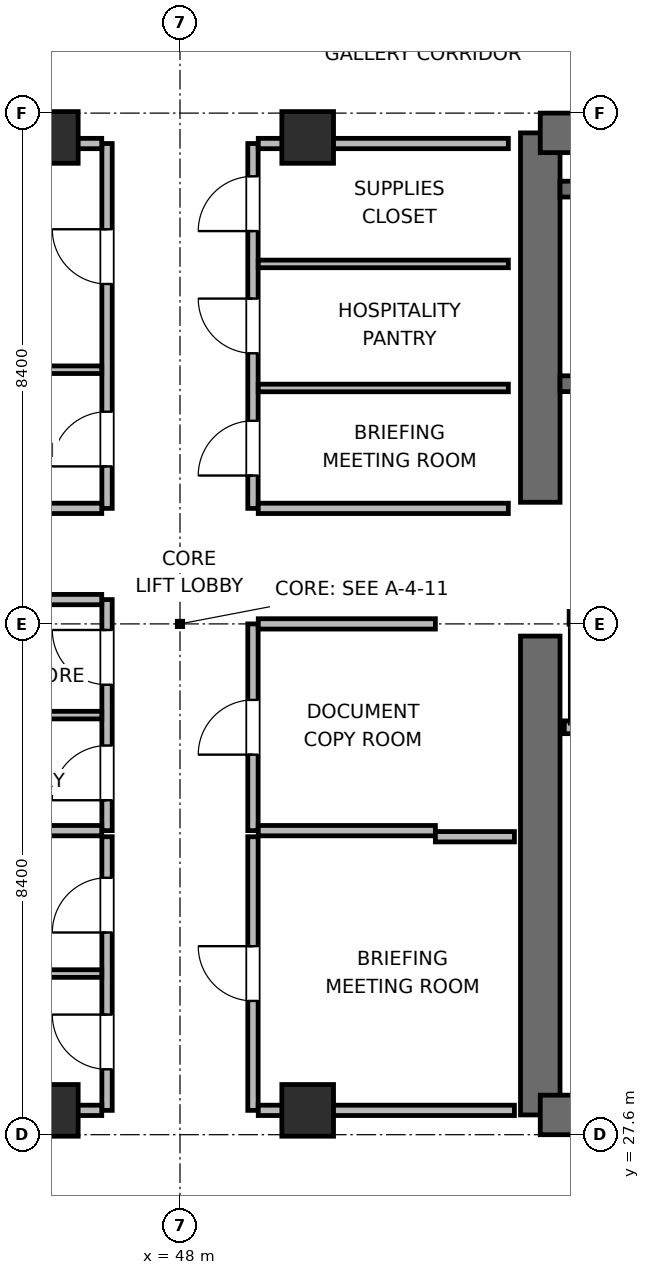
"""IFC4 building model, lengths in metres.
Left out: names, types, materials, properties, quantities, classifications, styles, units other than length and angle.
Written with IfcOpenShell. Run it as: python <this file> out.ifc"""

import sys

from ifc_helpers import new_model, si_unit, direction, frame, frame_2d, origin, origin_2d, place, context, subcontext, project, spatial, rectangle, extrude, element, fill, save


model = new_model("IFC4")
c1 = context("Model", 3, precision=1e-05, world=origin(), true_north=direction((0.0, 1.0)))
c2 = subcontext(c1, "Body", "Model", "MODEL_VIEW")
j1 = project(units=[si_unit("LENGTHUNIT", "METRE"), si_unit("PLANEANGLEUNIT", "RADIAN")], contexts=[c1])
p1 = place(None, origin())
s1 = spatial("IfcSite", under=j1, at=p1, CompositionType="ELEMENT")
p2 = place(p1, origin())
s2 = spatial("IfcBuilding", under=s1, at=p2, CompositionType="ELEMENT")
p3 = place(p2, frame((0.0, 0.0, 251.1)))
s3 = spatial("IfcBuildingStorey", under=s2, at=p3, CompositionType="ELEMENT", Elevation=251.1)
p4 = place(p3, frame((53.925, 27.925, 0.0), z_axis=(0.0, 0.0, 1.0), x_axis=(0.0, 1.0, 0.0)))
e1 = element("IfcWall", 1, at=p4, inside=s3, PredefinedType="SHEAR", context=c2, shape_type="SweptSolid", body=[
    extrude(rectangle(XDim=7.875, YDim=0.65, at=frame_2d((3.938, 0.0))), origin(), (0.0, 0.0, 1.0), 3.9),
])
p5 = place(p3, frame((53.925, 38.0, 0.0), z_axis=(0.0, 0.0, 1.0), x_axis=(0.0, 1.0, 0.0)))
e2 = element("IfcWall", 2, at=p5, inside=s3, PredefinedType="SHEAR", context=c2, shape_type="SweptSolid", body=[
    extrude(rectangle(XDim=6.075, YDim=0.65, at=frame_2d((3.038, 0.0))), origin(), (0.0, 0.0, 1.0), 3.9),
])
p6 = place(p3, frame((53.925, 27.925, 0.0), z_axis=(0.0, 0.0, 1.0), x_axis=(1.0, 0.0, 0.0)))
e3 = element("IfcWall", 3, at=p6, inside=s3, PredefinedType="SHEAR", context=c2, shape_type="SweptSolid", body=[
    extrude(rectangle(XDim=9.35, YDim=0.65, at=frame_2d((4.675, 0.0))), origin(), (0.0, 0.0, 1.0), 3.9),
])
p7 = place(p6, frame((3.975, 0.0, 0.0)))
e4 = element("IfcOpeningElement", 4, at=p7, cuts=e3, PredefinedType="OPENING", context=c2, shape_type="SweptSolid", body=[
    extrude(rectangle(XDim=1.05, YDim=2.04, at=frame_2d((0.525, 1.02))), frame((0.0, 0.335, 0.0), z_axis=(0.0, -1.0, 0.0), x_axis=(1.0, 0.0, 0.0)), (0.0, 0.0, 1.0), 0.67),
])
p8 = place(p3, frame((53.925, 44.075, 0.0), z_axis=(0.0, 0.0, 1.0), x_axis=(1.0, 0.0, 0.0)))
e5 = element("IfcWall", 5, at=p8, inside=s3, PredefinedType="SHEAR", context=c2, shape_type="SweptSolid", body=[
    extrude(rectangle(XDim=9.35, YDim=0.65, at=frame_2d((4.675, 0.0))), origin(), (0.0, 0.0, 1.0), 3.9),
])
p9 = place(p3, frame((54.25, 39.95, 0.0), z_axis=(0.0, 0.0, 1.0), x_axis=(1.0, 0.0, 0.0)))
e6 = element("IfcWall", 6, at=p9, inside=s3, PredefinedType="SHEAR", context=c2, shape_type="SweptSolid", body=[
    extrude(rectangle(XDim=8.7, YDim=0.26, at=frame_2d((4.35, 0.0))), origin(), (0.0, 0.0, 1.0), 3.9),
])
p10 = place(p9, frame((0.95, 0.0, 0.0)))
e7 = element("IfcOpeningElement", 7, at=p10, cuts=e6, PredefinedType="OPENING", context=c2, shape_type="SweptSolid", body=[
    extrude(rectangle(XDim=1.0, YDim=2.04, at=frame_2d((0.5, 1.02))), frame((0.0, 0.14, 0.0), z_axis=(0.0, -1.0, 0.0), x_axis=(1.0, 0.0, 0.0)), (0.0, 0.0, 1.0), 0.28),
])
p11 = place(p3, frame((54.25, 43.15, 0.0), z_axis=(0.0, 0.0, 1.0), x_axis=(1.0, 0.0, 0.0)))
e8 = element("IfcWall", 8, at=p11, inside=s3, PredefinedType="SHEAR", context=c2, shape_type="SweptSolid", body=[
    extrude(rectangle(XDim=8.7, YDim=0.26, at=frame_2d((4.35, 0.0))), origin(), (0.0, 0.0, 1.0), 3.9),
])
for number, where, z_axis, x_axis in (
    (9, (45.9, 28.0, 0.0), (0.0, 0.0, 1.0), (1.0, 0.0, 0.0)),
    (10, (50.1, 28.0, 0.0), (0.0, 0.0, 1.0), (1.0, 0.0, 0.0)),
    (11, (45.9, 44.0, 0.0), (0.0, 0.0, 1.0), (1.0, 0.0, 0.0)),
    (12, (50.1, 44.0, 0.0), (0.0, 0.0, 1.0), (1.0, 0.0, 0.0)),
):
    element("IfcColumn", number, at=place(p3, frame(where, z_axis=z_axis, x_axis=x_axis)), inside=s3, PredefinedType="COLUMN", context=c2, shape_type="SweptSolid", body=[
        extrude(rectangle(XDim=0.85, YDim=0.85, at=origin_2d()), origin(), (0.0, 0.0, 1.0), 3.9),
    ])
p12 = place(p3, frame((54.32, 34.3, 0.0), z_axis=(0.0, 0.0, 1.0), x_axis=(1.0, 0.0, 0.0)))
e13 = element("IfcWall", 13, at=p12, inside=s3, PredefinedType="PARTITIONING", context=c2, shape_type="SweptSolid", body=[
    extrude(rectangle(XDim=3.48, YDim=0.21, at=frame_2d((1.74, 0.0))), origin(), (0.0, 0.0, 1.0), 3.68),
])
p13 = place(p3, frame((54.4, 36.1, 0.0), z_axis=(0.0, 0.0, 1.0), x_axis=(1.0, 0.0, 0.0)))
e14 = element("IfcWall", 14, at=p13, inside=s3, PredefinedType="PARTITIONING", context=c2, shape_type="SweptSolid", body=[
    extrude(rectangle(XDim=2.1, YDim=0.21, at=frame_2d((1.05, 0.0))), origin(), (0.0, 0.0, 1.0), 3.68),
])
p14 = place(p13, frame((0.5, 0.0, 0.0)))
e15 = element("IfcOpeningElement", 15, at=p14, cuts=e14, PredefinedType="OPENING", context=c2, shape_type="SweptSolid", body=[
    extrude(rectangle(XDim=1.1, YDim=2.04, at=frame_2d((0.55, 1.02))), frame((0.0, 0.115, 0.0), z_axis=(0.0, -1.0, 0.0), x_axis=(1.0, 0.0, 0.0)), (0.0, 0.0, 1.0), 0.23),
])
p15 = place(p3, frame((46.8, 32.6, 0.0), z_axis=(0.0, 0.0, 1.0), x_axis=(0.0, 1.0, 0.0)))
e16 = element("IfcWall", 16, at=p15, inside=s3, PredefinedType="PARTITIONING", context=c2, shape_type="SweptSolid", body=[
    extrude(rectangle(XDim=3.8, YDim=0.17, at=frame_2d((1.9, 0.0))), origin(), (0.0, 0.0, 1.0), 3.68),
])
p16 = place(p15, frame((0.5, 0.0, 0.0)))
e17 = element("IfcOpeningElement", 17, at=p16, cuts=e16, PredefinedType="OPENING", context=c2, shape_type="SweptSolid", body=[
    extrude(rectangle(XDim=0.9, YDim=2.02, at=frame_2d((0.45, 1.01))), frame((0.0, 0.095, 0.0), z_axis=(0.0, -1.0, 0.0), x_axis=(1.0, 0.0, 0.0)), (0.0, 0.0, 1.0), 0.19),
])
p17 = place(p15, frame((2.4, 0.0, 0.0)))
e18 = element("IfcOpeningElement", 18, at=p17, cuts=e16, PredefinedType="OPENING", context=c2, shape_type="SweptSolid", body=[
    extrude(rectangle(XDim=0.9, YDim=2.02, at=frame_2d((0.45, 1.01))), frame((0.0, 0.095, 0.0), z_axis=(0.0, -1.0, 0.0), x_axis=(1.0, 0.0, 0.0)), (0.0, 0.0, 1.0), 0.19),
])
for number, where, z_axis, x_axis in (
    (19, (43.8, 32.6, 0.0), (0.0, 0.0, 1.0), (1.0, 0.0, 0.0)),
    (20, (43.8, 36.4, 0.0), (0.0, 0.0, 1.0), (1.0, 0.0, 0.0)),
):
    element("IfcWall", number, at=place(p3, frame(where, z_axis=z_axis, x_axis=x_axis)), inside=s3, PredefinedType="PARTITIONING", context=c2, shape_type="SweptSolid", body=[
        extrude(rectangle(XDim=2.913, YDim=0.17, at=frame_2d((1.457, 0.0))), origin(), (0.0, 0.0, 1.0), 3.68),
    ])
p18 = place(p3, frame((43.8, 34.5, 0.0), z_axis=(0.0, 0.0, 1.0), x_axis=(1.0, 0.0, 0.0)))
e21 = element("IfcWall", 21, at=p18, inside=s3, PredefinedType="PARTITIONING", context=c2, shape_type="SweptSolid", body=[
    extrude(rectangle(XDim=2.913, YDim=0.125, at=frame_2d((1.457, 0.0))), origin(), (0.0, 0.0, 1.0), 3.68),
])
p19 = place(p3, frame((49.2, 32.6, 0.0), z_axis=(0.0, 0.0, 1.0), x_axis=(0.0, 1.0, 0.0)))
e22 = element("IfcWall", 22, at=p19, inside=s3, PredefinedType="PARTITIONING", context=c2, shape_type="SweptSolid", body=[
    extrude(rectangle(XDim=3.4, YDim=0.17, at=frame_2d((1.7, 0.0))), origin(), (0.0, 0.0, 1.0), 3.68),
])
p20 = place(p19, frame((1.25, 0.0, 0.0)))
e23 = element("IfcOpeningElement", 23, at=p20, cuts=e22, PredefinedType="OPENING", context=c2, shape_type="SweptSolid", body=[
    extrude(rectangle(XDim=0.9, YDim=2.02, at=frame_2d((0.45, 1.01))), frame((0.0, 0.095, 0.0), z_axis=(0.0, -1.0, 0.0), x_axis=(1.0, 0.0, 0.0)), (0.0, 0.0, 1.0), 0.19),
])
for number, where, z_axis, x_axis in (
    (24, (49.287, 32.6, 0.0), (0.0, 0.0, 1.0), (1.0, 0.0, 0.0)),
    (25, (49.287, 36.0, 0.0), (0.0, 0.0, 1.0), (1.0, 0.0, 0.0)),
):
    element("IfcWall", number, at=place(p3, frame(where, z_axis=z_axis, x_axis=x_axis)), inside=s3, PredefinedType="PARTITIONING", context=c2, shape_type="SweptSolid", body=[
        extrude(rectangle(XDim=2.913, YDim=0.17, at=frame_2d((1.457, 0.0))), origin(), (0.0, 0.0, 1.0), 3.68),
    ])
p21 = place(p3, frame((46.8, 28.0, 0.0), z_axis=(0.0, 0.0, 1.0), x_axis=(0.0, 1.0, 0.0)))
e26 = element("IfcWall", 26, at=p21, inside=s3, PredefinedType="PARTITIONING", context=c2, shape_type="SweptSolid", body=[
    extrude(rectangle(XDim=4.5, YDim=0.17, at=frame_2d((2.25, 0.0))), origin(), (0.0, 0.0, 1.0), 3.68),
])
p22 = place(p21, frame((0.675, 0.0, 0.0)))
e27 = element("IfcOpeningElement", 27, at=p22, cuts=e26, PredefinedType="OPENING", context=c2, shape_type="SweptSolid", body=[
    extrude(rectangle(XDim=0.9, YDim=2.02, at=frame_2d((0.45, 1.01))), frame((0.0, 0.095, 0.0), z_axis=(0.0, -1.0, 0.0), x_axis=(1.0, 0.0, 0.0)), (0.0, 0.0, 1.0), 0.19),
])
p23 = place(p21, frame((2.925, 0.0, 0.0)))
e28 = element("IfcOpeningElement", 28, at=p23, cuts=e26, PredefinedType="OPENING", context=c2, shape_type="SweptSolid", body=[
    extrude(rectangle(XDim=0.9, YDim=2.02, at=frame_2d((0.45, 1.01))), frame((0.0, 0.095, 0.0), z_axis=(0.0, -1.0, 0.0), x_axis=(1.0, 0.0, 0.0)), (0.0, 0.0, 1.0), 0.19),
])
p24 = place(p3, frame((42.5, 28.0, 0.0), z_axis=(0.0, 0.0, 1.0), x_axis=(1.0, 0.0, 0.0)))
e29 = element("IfcWall", 29, at=p24, inside=s3, PredefinedType="PARTITIONING", context=c2, shape_type="SweptSolid", body=[
    extrude(rectangle(XDim=4.213, YDim=0.17, at=frame_2d((2.106, 0.0))), origin(), (0.0, 0.0, 1.0), 2.765),
])
p25 = place(p3, frame((42.5, 30.25, 0.0), z_axis=(0.0, 0.0, 1.0), x_axis=(1.0, 0.0, 0.0)))
e30 = element("IfcWall", 30, at=p25, inside=s3, PredefinedType="PARTITIONING", context=c2, shape_type="SweptSolid", body=[
    extrude(rectangle(XDim=4.213, YDim=0.125, at=frame_2d((2.106, 0.0))), origin(), (0.0, 0.0, 1.0), 3.68),
])
p26 = place(p3, frame((49.2, 28.0, 0.0), z_axis=(0.0, 0.0, 1.0), x_axis=(0.0, 1.0, 0.0)))
e31 = element("IfcWall", 31, at=p26, inside=s3, PredefinedType="PARTITIONING", context=c2, shape_type="SweptSolid", body=[
    extrude(rectangle(XDim=4.5, YDim=0.17, at=frame_2d((2.25, 0.0))), origin(), (0.0, 0.0, 1.0), 3.68),
])
p27 = place(p26, frame((1.8, 0.0, 0.0)))
e32 = element("IfcOpeningElement", 32, at=p27, cuts=e31, PredefinedType="OPENING", context=c2, shape_type="SweptSolid", body=[
    extrude(rectangle(XDim=0.9, YDim=2.02, at=frame_2d((0.45, 1.01))), frame((0.0, 0.095, 0.0), z_axis=(0.0, -1.0, 0.0), x_axis=(1.0, 0.0, 0.0)), (0.0, 0.0, 1.0), 0.19),
])
p28 = place(p3, frame((49.287, 28.0, 0.0), z_axis=(0.0, 0.0, 1.0), x_axis=(1.0, 0.0, 0.0)))
e33 = element("IfcWall", 33, at=p28, inside=s3, PredefinedType="PARTITIONING", context=c2, shape_type="SweptSolid", body=[
    extrude(rectangle(XDim=4.213, YDim=0.17, at=frame_2d((2.106, 0.0))), origin(), (0.0, 0.0, 1.0), 2.765),
])
p29 = place(p3, frame((52.2, 32.5, 0.0), z_axis=(0.0, 0.0, 1.0), x_axis=(1.0, 0.0, 0.0)))
e34 = element("IfcWall", 34, at=p29, inside=s3, PredefinedType="PARTITIONING", context=c2, shape_type="SweptSolid", body=[
    extrude(rectangle(XDim=1.3, YDim=0.17, at=frame_2d((0.65, 0.0))), origin(), (0.0, 0.0, 1.0), 3.68),
])
p30 = place(p3, frame((46.8, 37.9, 0.0), z_axis=(0.0, 0.0, 1.0), x_axis=(0.0, 1.0, 0.0)))
e35 = element("IfcWall", 35, at=p30, inside=s3, PredefinedType="PARTITIONING", context=c2, shape_type="SweptSolid", body=[
    extrude(rectangle(XDim=6.0, YDim=0.17, at=frame_2d((3.0, 0.0))), origin(), (0.0, 0.0, 1.0), 3.68),
])
p31 = place(p30, frame((0.69, 0.0, 0.0)))
e36 = element("IfcOpeningElement", 36, at=p31, cuts=e35, PredefinedType="OPENING", context=c2, shape_type="SweptSolid", body=[
    extrude(rectangle(XDim=0.9, YDim=2.02, at=frame_2d((0.45, 1.01))), frame((0.0, 0.095, 0.0), z_axis=(0.0, -1.0, 0.0), x_axis=(1.0, 0.0, 0.0)), (0.0, 0.0, 1.0), 0.19),
])
p32 = place(p30, frame((3.69, 0.0, 0.0)))
e37 = element("IfcOpeningElement", 37, at=p32, cuts=e35, PredefinedType="OPENING", context=c2, shape_type="SweptSolid", body=[
    extrude(rectangle(XDim=0.9, YDim=2.02, at=frame_2d((0.45, 1.01))), frame((0.0, 0.095, 0.0), z_axis=(0.0, -1.0, 0.0), x_axis=(1.0, 0.0, 0.0)), (0.0, 0.0, 1.0), 0.19),
])
p33 = place(p3, frame((42.5, 37.9, 0.0), z_axis=(0.0, 0.0, 1.0), x_axis=(1.0, 0.0, 0.0)))
e38 = element("IfcWall", 38, at=p33, inside=s3, PredefinedType="PARTITIONING", context=c2, shape_type="SweptSolid", body=[
    extrude(rectangle(XDim=4.213, YDim=0.17, at=frame_2d((2.106, 0.0))), origin(), (0.0, 0.0, 1.0), 3.68),
])
p34 = place(p3, frame((42.5, 43.9, 0.0), z_axis=(0.0, 0.0, 1.0), x_axis=(1.0, 0.0, 0.0)))
e39 = element("IfcWall", 39, at=p34, inside=s3, PredefinedType="PARTITIONING", context=c2, shape_type="SweptSolid", body=[
    extrude(rectangle(XDim=4.213, YDim=0.17, at=frame_2d((2.106, 0.0))), origin(), (0.0, 0.0, 1.0), 2.765),
])
p35 = place(p3, frame((42.5, 40.18, 0.0), z_axis=(0.0, 0.0, 1.0), x_axis=(1.0, 0.0, 0.0)))
e40 = element("IfcWall", 40, at=p35, inside=s3, PredefinedType="PARTITIONING", context=c2, shape_type="SweptSolid", body=[
    extrude(rectangle(XDim=4.213, YDim=0.125, at=frame_2d((2.106, 0.0))), origin(), (0.0, 0.0, 1.0), 3.68),
])
p36 = place(p3, frame((49.2, 37.9, 0.0), z_axis=(0.0, 0.0, 1.0), x_axis=(0.0, 1.0, 0.0)))
e41 = element("IfcWall", 41, at=p36, inside=s3, PredefinedType="PARTITIONING", context=c2, shape_type="SweptSolid", body=[
    extrude(rectangle(XDim=6.0, YDim=0.17, at=frame_2d((3.0, 0.0))), origin(), (0.0, 0.0, 1.0), 3.68),
])
p37 = place(p36, frame((0.54, 0.0, 0.0)))
e42 = element("IfcOpeningElement", 42, at=p37, cuts=e41, PredefinedType="OPENING", context=c2, shape_type="SweptSolid", body=[
    extrude(rectangle(XDim=0.9, YDim=2.02, at=frame_2d((0.45, 1.01))), frame((0.0, 0.095, 0.0), z_axis=(0.0, -1.0, 0.0), x_axis=(1.0, 0.0, 0.0)), (0.0, 0.0, 1.0), 0.19),
])
p38 = place(p36, frame((2.55, 0.0, 0.0)))
e43 = element("IfcOpeningElement", 43, at=p38, cuts=e41, PredefinedType="OPENING", context=c2, shape_type="SweptSolid", body=[
    extrude(rectangle(XDim=0.9, YDim=2.02, at=frame_2d((0.45, 1.01))), frame((0.0, 0.095, 0.0), z_axis=(0.0, -1.0, 0.0), x_axis=(1.0, 0.0, 0.0)), (0.0, 0.0, 1.0), 0.19),
])
p39 = place(p36, frame((4.56, 0.0, 0.0)))
e44 = element("IfcOpeningElement", 44, at=p39, cuts=e41, PredefinedType="OPENING", context=c2, shape_type="SweptSolid", body=[
    extrude(rectangle(XDim=0.9, YDim=2.02, at=frame_2d((0.45, 1.01))), frame((0.0, 0.095, 0.0), z_axis=(0.0, -1.0, 0.0), x_axis=(1.0, 0.0, 0.0)), (0.0, 0.0, 1.0), 0.19),
])
p40 = place(p3, frame((49.287, 37.9, 0.0), z_axis=(0.0, 0.0, 1.0), x_axis=(1.0, 0.0, 0.0)))
e45 = element("IfcWall", 45, at=p40, inside=s3, PredefinedType="PARTITIONING", context=c2, shape_type="SweptSolid", body=[
    extrude(rectangle(XDim=4.113, YDim=0.17, at=frame_2d((2.056, 0.0))), origin(), (0.0, 0.0, 1.0), 3.68),
])
p41 = place(p3, frame((49.287, 43.9, 0.0), z_axis=(0.0, 0.0, 1.0), x_axis=(1.0, 0.0, 0.0)))
e46 = element("IfcWall", 46, at=p41, inside=s3, PredefinedType="PARTITIONING", context=c2, shape_type="SweptSolid", body=[
    extrude(rectangle(XDim=4.113, YDim=0.17, at=frame_2d((2.056, 0.0))), origin(), (0.0, 0.0, 1.0), 2.765),
])
for number, where, z_axis, x_axis in (
    (47, (49.287, 39.88, 0.0), (0.0, 0.0, 1.0), (1.0, 0.0, 0.0)),
    (48, (49.287, 41.92, 0.0), (0.0, 0.0, 1.0), (1.0, 0.0, 0.0)),
):
    element("IfcWall", number, at=place(p3, frame(where, z_axis=z_axis, x_axis=x_axis)), inside=s3, PredefinedType="PARTITIONING", context=c2, shape_type="SweptSolid", body=[
        extrude(rectangle(XDim=4.113, YDim=0.125, at=frame_2d((2.056, 0.0))), origin(), (0.0, 0.0, 1.0), 3.68),
    ])
p42 = place(p16, origin())
e49 = element("IfcDoor", 49, at=p42, inside=s3, OperationType="SINGLE_SWING_LEFT", PredefinedType="DOOR", context=c2, shape_type="SweptSolid", body=[
    extrude(rectangle(XDim=0.9, YDim=2.02, at=frame_2d((0.45, 1.01))), frame((0.0, 0.025, 0.0), z_axis=(0.0, -1.0, 0.0), x_axis=(1.0, 0.0, 0.0)), (0.0, 0.0, 1.0), 0.05),
])
fill(e17, e49)
p43 = place(p17, origin())
e50 = element("IfcDoor", 50, at=p43, inside=s3, OperationType="SINGLE_SWING_RIGHT", PredefinedType="DOOR", context=c2, shape_type="SweptSolid", body=[
    extrude(rectangle(XDim=0.9, YDim=2.02, at=frame_2d((0.45, 1.01))), frame((0.0, 0.025, 0.0), z_axis=(0.0, -1.0, 0.0), x_axis=(1.0, 0.0, 0.0)), (0.0, 0.0, 1.0), 0.05),
])
fill(e18, e50)
p44 = place(p20, origin())
e51 = element("IfcDoor", 51, at=p44, inside=s3, OperationType="SINGLE_SWING_LEFT", PredefinedType="DOOR", context=c2, shape_type="SweptSolid", body=[
    extrude(rectangle(XDim=0.9, YDim=2.02, at=frame_2d((0.45, 1.01))), frame((0.0, 0.025, 0.0), z_axis=(0.0, -1.0, 0.0), x_axis=(1.0, 0.0, 0.0)), (0.0, 0.0, 1.0), 0.05),
])
fill(e23, e51)
p45 = place(p22, origin())
e52 = element("IfcDoor", 52, at=p45, inside=s3, OperationType="SINGLE_SWING_RIGHT", PredefinedType="DOOR", context=c2, shape_type="SweptSolid", body=[
    extrude(rectangle(XDim=0.9, YDim=2.02, at=frame_2d((0.45, 1.01))), frame((0.0, 0.025, 0.0), z_axis=(0.0, -1.0, 0.0), x_axis=(1.0, 0.0, 0.0)), (0.0, 0.0, 1.0), 0.05),
])
fill(e27, e52)
p46 = place(p23, origin())
e53 = element("IfcDoor", 53, at=p46, inside=s3, OperationType="SINGLE_SWING_LEFT", PredefinedType="DOOR", context=c2, shape_type="SweptSolid", body=[
    extrude(rectangle(XDim=0.9, YDim=2.02, at=frame_2d((0.45, 1.01))), frame((0.0, 0.025, 0.0), z_axis=(0.0, -1.0, 0.0), x_axis=(1.0, 0.0, 0.0)), (0.0, 0.0, 1.0), 0.05),
])
fill(e28, e53)
p47 = place(p27, origin())
e54 = element("IfcDoor", 54, at=p47, inside=s3, OperationType="SINGLE_SWING_RIGHT", PredefinedType="DOOR", context=c2, shape_type="SweptSolid", body=[
    extrude(rectangle(XDim=0.9, YDim=2.02, at=frame_2d((0.45, 1.01))), frame((0.0, 0.025, 0.0), z_axis=(0.0, -1.0, 0.0), x_axis=(1.0, 0.0, 0.0)), (0.0, 0.0, 1.0), 0.05),
])
fill(e32, e54)
p48 = place(p31, origin())
e55 = element("IfcDoor", 55, at=p48, inside=s3, OperationType="SINGLE_SWING_LEFT", PredefinedType="DOOR", context=c2, shape_type="SweptSolid", body=[
    extrude(rectangle(XDim=0.9, YDim=2.02, at=frame_2d((0.45, 1.01))), frame((0.0, 0.025, 0.0), z_axis=(0.0, -1.0, 0.0), x_axis=(1.0, 0.0, 0.0)), (0.0, 0.0, 1.0), 0.05),
])
fill(e36, e55)
p49 = place(p32, origin())
e56 = element("IfcDoor", 56, at=p49, inside=s3, OperationType="SINGLE_SWING_RIGHT", PredefinedType="DOOR", context=c2, shape_type="SweptSolid", body=[
    extrude(rectangle(XDim=0.9, YDim=2.02, at=frame_2d((0.45, 1.01))), frame((0.0, 0.025, 0.0), z_axis=(0.0, -1.0, 0.0), x_axis=(1.0, 0.0, 0.0)), (0.0, 0.0, 1.0), 0.05),
])
fill(e37, e56)
p50 = place(p37, origin())
e57 = element("IfcDoor", 57, at=p50, inside=s3, OperationType="SINGLE_SWING_LEFT", PredefinedType="DOOR", context=c2, shape_type="SweptSolid", body=[
    extrude(rectangle(XDim=0.9, YDim=2.02, at=frame_2d((0.45, 1.01))), frame((0.0, 0.025, 0.0), z_axis=(0.0, -1.0, 0.0), x_axis=(1.0, 0.0, 0.0)), (0.0, 0.0, 1.0), 0.05),
])
fill(e42, e57)
p51 = place(p38, origin())
e58 = element("IfcDoor", 58, at=p51, inside=s3, OperationType="SINGLE_SWING_RIGHT", PredefinedType="DOOR", context=c2, shape_type="SweptSolid", body=[
    extrude(rectangle(XDim=0.9, YDim=2.02, at=frame_2d((0.45, 1.01))), frame((0.0, 0.025, 0.0), z_axis=(0.0, -1.0, 0.0), x_axis=(1.0, 0.0, 0.0)), (0.0, 0.0, 1.0), 0.05),
])
fill(e43, e58)
p52 = place(p39, origin())
e59 = element("IfcDoor", 59, at=p52, inside=s3, OperationType="SINGLE_SWING_LEFT", PredefinedType="DOOR", context=c2, shape_type="SweptSolid", body=[
    extrude(rectangle(XDim=0.9, YDim=2.02, at=frame_2d((0.45, 1.01))), frame((0.0, 0.025, 0.0), z_axis=(0.0, -1.0, 0.0), x_axis=(1.0, 0.0, 0.0)), (0.0, 0.0, 1.0), 0.05),
])
fill(e44, e59)
save(model, sys.argv[1])
